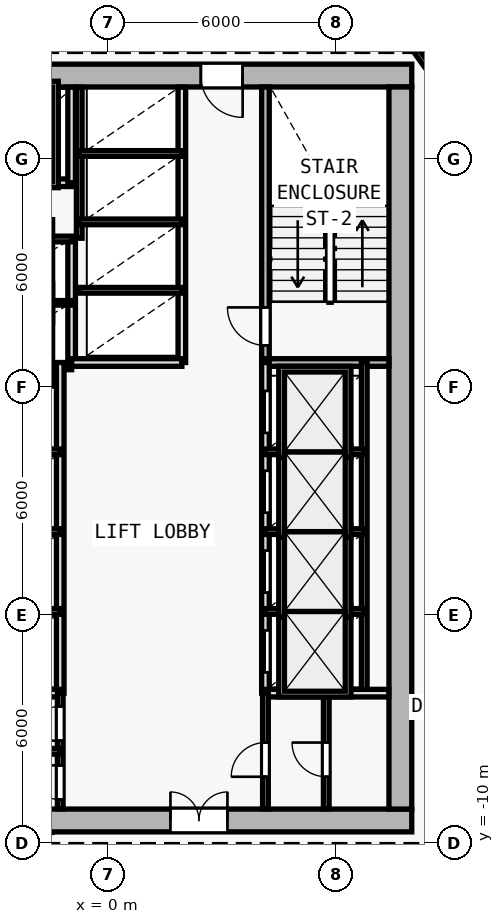
"""IFC4 building model, lengths in metres.
Left out: names, types, materials, properties, quantities, classifications, styles, units other than length and angle.
Written with IfcOpenShell. Run it as: python <this file> out.ifc"""

import sys

from ifc_helpers import new_model, si_unit, direction, frame, frame_2d, origin, origin_2d, place, context, subcontext, project, spatial, rectangle, i_section, extrude, element, fill, save


model = new_model("IFC4")
c1 = context("Model", 3, precision=1e-05, world=origin(), true_north=direction((0.0, 1.0)))
c2 = subcontext(c1, "Body", "Model", "MODEL_VIEW")
j1 = project(units=[si_unit("LENGTHUNIT", "METRE"), si_unit("PLANEANGLEUNIT", "RADIAN")], contexts=[c1])
p1 = place(None, origin())
s1 = spatial("IfcSite", under=j1, at=p1, CompositionType="ELEMENT")
p2 = place(p1, origin())
s2 = spatial("IfcBuilding", under=s1, at=p2, CompositionType="ELEMENT")
p3 = place(p2, frame((0.0, 0.0, 40.8)))
s3 = spatial("IfcBuildingStorey", under=s2, at=p3, CompositionType="ELEMENT", Elevation=40.8)
for number, where, z_axis, x_axis in (
    (1, (7.7, -9.4, 0.0), (0.0, 0.0, 1.0), (1.0, 0.0, 0.0)),
    (2, (7.7, 10.2, 0.0), (0.0, 0.0, 1.0), (1.0, 0.0, 0.0)),
    (3, (0.0, -9.4, 0.0), (0.0, 0.0, 1.0), (1.0, 0.0, 0.0)),
    (4, (7.7, 0.4, 0.0), (0.0, 0.0, 1.0), (1.0, 0.0, 0.0)),
):
    element("IfcColumn", number, at=place(p3, frame(where, z_axis=z_axis, x_axis=x_axis)), inside=s3, PredefinedType="COLUMN", context=c2, shape_type="SweptSolid", body=[
        extrude(i_section(OverallWidth=0.416, OverallDepth=0.446, WebThickness=0.025, FlangeThickness=0.04, FilletRadius=0.015, at=origin_2d()), origin(), (0.0, 0.0, 1.0), 3.6),
    ])
p4 = place(p3, frame((-8.0, -9.4, 0.0), z_axis=(0.0, 0.0, 1.0), x_axis=(1.0, 0.0, 0.0)))
e5 = element("IfcWall", 5, at=p4, inside=s3, PredefinedType="SHEAR", context=c2, shape_type="SweptSolid", body=[
    extrude(rectangle(XDim=16.0, YDim=0.6, at=frame_2d((8.0, 0.0))), origin(), (0.0, 0.0, 1.0), 3.35),
])
p5 = place(p4, frame((9.65, 0.0, 0.0)))
e6 = element("IfcOpeningElement", 6, at=p5, cuts=e5, PredefinedType="OPENING", context=c2, shape_type="SweptSolid", body=[
    extrude(rectangle(XDim=1.5, YDim=2.2, at=frame_2d((0.75, 1.1))), frame((0.0, 0.31, 0.0), z_axis=(0.0, -1.0, 0.0), x_axis=(1.0, 0.0, 0.0)), (0.0, 0.0, 1.0), 0.62),
])
p6 = place(p3, frame((8.0, 10.2, 0.0), z_axis=(0.0, 0.0, 1.0), x_axis=(-1.0, 0.0, 0.0)))
e7 = element("IfcWall", 7, at=p6, inside=s3, PredefinedType="SHEAR", context=c2, shape_type="SweptSolid", body=[
    extrude(rectangle(XDim=16.0, YDim=0.6, at=frame_2d((8.0, 0.0))), origin(), (0.0, 0.0, 1.0), 3.35),
])
p7 = place(p6, frame((4.45, 0.0, 0.0)))
e8 = element("IfcOpeningElement", 8, at=p7, cuts=e7, PredefinedType="OPENING", context=c2, shape_type="SweptSolid", body=[
    extrude(rectangle(XDim=1.1, YDim=2.15, at=frame_2d((0.55, 1.075))), frame((0.0, 0.31, 0.0), z_axis=(0.0, -1.0, 0.0), x_axis=(1.0, 0.0, 0.0)), (0.0, 0.0, 1.0), 0.62),
])
p8 = place(p3, frame((7.7, 9.9, 0.0), z_axis=(0.0, 0.0, 1.0), x_axis=(0.0, -1.0, 0.0)))
e9 = element("IfcWall", 9, at=p8, inside=s3, PredefinedType="SHEAR", context=c2, shape_type="SweptSolid", body=[
    extrude(rectangle(XDim=19.0, YDim=0.6, at=frame_2d((9.5, 0.0))), origin(), (0.0, 0.0, 1.0), 3.35),
])
p9 = place(p3, frame((4.15, 2.75, 0.0), z_axis=(0.0, 0.0, 1.0), x_axis=(0.0, 1.0, 0.0)))
e10 = element("IfcWall", 10, at=p9, inside=s3, PredefinedType="SOLIDWALL", context=c2, shape_type="SweptSolid", body=[
    extrude(rectangle(XDim=7.15, YDim=0.2, at=frame_2d((3.575, 0.0))), origin(), (0.0, 0.0, 1.0), 3.35),
])
p10 = place(p9, frame((0.35, 0.0, 0.0)))
e11 = element("IfcOpeningElement", 11, at=p10, cuts=e10, PredefinedType="OPENING", context=c2, shape_type="SweptSolid", body=[
    extrude(rectangle(XDim=1.0, YDim=2.15, at=frame_2d((0.5, 1.075))), frame((0.0, 0.11, 0.0), z_axis=(0.0, -1.0, 0.0), x_axis=(1.0, 0.0, 0.0)), (0.0, 0.0, 1.0), 0.22),
])
p11 = place(p3, frame((4.05, 2.65, 0.0), z_axis=(0.0, 0.0, 1.0), x_axis=(1.0, 0.0, 0.0)))
e12 = element("IfcWall", 12, at=p11, inside=s3, PredefinedType="SOLIDWALL", context=c2, shape_type="SweptSolid", body=[
    extrude(rectangle(XDim=3.35, YDim=0.2, at=frame_2d((1.675, 0.0))), origin(), (0.0, 0.0, 1.0), 3.35),
])
p12 = place(p3, frame((-0.95, 2.65, 0.0), z_axis=(0.0, 0.0, 1.0), x_axis=(0.0, 1.0, 0.0)))
e13 = element("IfcWall", 13, at=p12, inside=s3, PredefinedType="SOLIDWALL", context=c2, shape_type="SweptSolid", body=[
    extrude(rectangle(XDim=3.27, YDim=0.2, at=frame_2d((1.635, 0.0))), origin(), (0.0, 0.0, 1.0), 3.35),
])
for number, where, z_axis, x_axis in (
    (14, (-3.85, 2.52, 0.0), (0.0, 0.0, 1.0), (1.0, 0.0, 0.0)),
    (15, (-3.85, 4.22, 0.0), (0.0, 0.0, 1.0), (1.0, 0.0, 0.0)),
):
    element("IfcWall", number, at=place(p3, frame(where, z_axis=z_axis, x_axis=x_axis)), inside=s3, PredefinedType="PARTITIONING", context=c2, shape_type="SweptSolid", body=[
        extrude(rectangle(XDim=2.9, YDim=0.12, at=frame_2d((1.45, 0.0))), origin(), (0.0, 0.0, 1.0), 3.35),
    ])
p13 = place(p3, frame((-3.85, 5.9, 0.0), z_axis=(0.0, 0.0, 1.0), x_axis=(1.0, 0.0, 0.0)))
e16 = element("IfcWall", 16, at=p13, inside=s3, PredefinedType="PARTITIONING", context=c2, shape_type="SweptSolid", body=[
    extrude(rectangle(XDim=2.9, YDim=0.15, at=frame_2d((1.45, 0.0))), origin(), (0.0, 0.0, 1.0), 3.35),
])
p14 = place(p3, frame((-3.85, 7.38, 0.0), z_axis=(0.0, 0.0, 1.0), x_axis=(1.0, 0.0, 0.0)))
e17 = element("IfcWall", 17, at=p14, inside=s3, PredefinedType="SOLIDWALL", context=c2, shape_type="SweptSolid", body=[
    extrude(rectangle(XDim=2.9, YDim=0.2, at=frame_2d((1.45, 0.0))), origin(), (0.0, 0.0, 1.0), 3.35),
])
p15 = place(p14, frame((0.85, 0.0, 0.0)))
e18 = element("IfcOpeningElement", 18, at=p15, cuts=e17, PredefinedType="OPENING", context=c2, shape_type="SweptSolid", body=[
    extrude(rectangle(XDim=1.2, YDim=2.2, at=frame_2d((0.6, 1.1))), frame((0.0, 0.11, 0.0), z_axis=(0.0, -1.0, 0.0), x_axis=(1.0, 0.0, 0.0)), (0.0, 0.0, 1.0), 0.22),
])
p16 = place(p3, frame((-0.95, 7.38, 0.0), z_axis=(0.0, 0.0, 1.0), x_axis=(0.0, 1.0, 0.0)))
e19 = element("IfcWall", 19, at=p16, inside=s3, PredefinedType="SOLIDWALL", context=c2, shape_type="SweptSolid", body=[
    extrude(rectangle(XDim=2.515, YDim=0.2, at=frame_2d((1.258, 0.0))), origin(), (0.0, 0.0, 1.0), 3.35),
])
p17 = place(p3, frame((4.15, -6.05, 0.0), z_axis=(0.0, 0.0, 1.0), x_axis=(0.0, 1.0, 0.0)))
e20 = element("IfcWall", 20, at=p17, inside=s3, PredefinedType="SOLIDWALL", context=c2, shape_type="SweptSolid", body=[
    extrude(rectangle(XDim=8.7, YDim=0.2, at=frame_2d((4.35, 0.0))), origin(), (0.0, 0.0, 1.0), 3.35),
])
p18 = place(p17, frame((0.55, 0.0, 0.0)))
e21 = element("IfcOpeningElement", 21, at=p18, cuts=e20, PredefinedType="OPENING", context=c2, shape_type="SweptSolid", body=[
    extrude(rectangle(XDim=1.1, YDim=2.15, at=frame_2d((0.55, 1.075))), frame((0.0, 0.11, 0.0), z_axis=(0.0, -1.0, 0.0), x_axis=(1.0, 0.0, 0.0)), (0.0, 0.0, 1.0), 0.22),
])
p19 = place(p17, frame((2.65, 0.0, 0.0)))
e22 = element("IfcOpeningElement", 22, at=p19, cuts=e20, PredefinedType="OPENING", context=c2, shape_type="SweptSolid", body=[
    extrude(rectangle(XDim=1.1, YDim=2.15, at=frame_2d((0.55, 1.075))), frame((0.0, 0.11, 0.0), z_axis=(0.0, -1.0, 0.0), x_axis=(1.0, 0.0, 0.0)), (0.0, 0.0, 1.0), 0.22),
])
p20 = place(p17, frame((4.75, 0.0, 0.0)))
e23 = element("IfcOpeningElement", 23, at=p20, cuts=e20, PredefinedType="OPENING", context=c2, shape_type="SweptSolid", body=[
    extrude(rectangle(XDim=1.1, YDim=2.15, at=frame_2d((0.55, 1.075))), frame((0.0, 0.11, 0.0), z_axis=(0.0, -1.0, 0.0), x_axis=(1.0, 0.0, 0.0)), (0.0, 0.0, 1.0), 0.22),
])
p21 = place(p17, frame((6.85, 0.0, 0.0)))
e24 = element("IfcOpeningElement", 24, at=p21, cuts=e20, PredefinedType="OPENING", context=c2, shape_type="SweptSolid", body=[
    extrude(rectangle(XDim=1.1, YDim=2.15, at=frame_2d((0.55, 1.075))), frame((0.0, 0.11, 0.0), z_axis=(0.0, -1.0, 0.0), x_axis=(1.0, 0.0, 0.0)), (0.0, 0.0, 1.0), 0.22),
])
p22 = place(p3, frame((6.75, -6.05, 0.0), z_axis=(0.0, 0.0, 1.0), x_axis=(0.0, 1.0, 0.0)))
e25 = element("IfcWall", 25, at=p22, inside=s3, PredefinedType="PARTITIONING", context=c2, shape_type="SweptSolid", body=[
    extrude(rectangle(XDim=8.7, YDim=0.15, at=frame_2d((4.35, 0.0))), origin(), (0.0, 0.0, 1.0), 3.35),
])
for number, where, z_axis, x_axis in (
    (26, (4.15, -3.9, 0.0), (0.0, 0.0, 1.0), (1.0, 0.0, 0.0)),
    (27, (4.15, -1.8, 0.0), (0.0, 0.0, 1.0), (1.0, 0.0, 0.0)),
    (28, (4.15, 0.3, 0.0), (0.0, 0.0, 1.0), (1.0, 0.0, 0.0)),
):
    element("IfcWall", number, at=place(p3, frame(where, z_axis=z_axis, x_axis=x_axis)), inside=s3, PredefinedType="PARTITIONING", context=c2, shape_type="SweptSolid", body=[
        extrude(rectangle(XDim=2.6, YDim=0.15, at=frame_2d((1.3, 0.0))), origin(), (0.0, 0.0, 1.0), 3.35),
    ])
p23 = place(p3, frame((-1.25, -6.05, 0.0), z_axis=(0.0, 0.0, 1.0), x_axis=(0.0, 1.0, 0.0)))
e29 = element("IfcWall", 29, at=p23, inside=s3, PredefinedType="SOLIDWALL", context=c2, shape_type="SweptSolid", body=[
    extrude(rectangle(XDim=8.7, YDim=0.2, at=frame_2d((4.35, 0.0))), origin(), (0.0, 0.0, 1.0), 3.35),
])
for number, where, z_axis, x_axis in (
    (30, (-4.15, -3.9, 0.0), (0.0, 0.0, 1.0), (1.0, 0.0, 0.0)),
    (31, (-4.15, -1.8, 0.0), (0.0, 0.0, 1.0), (1.0, 0.0, 0.0)),
    (32, (-4.15, 0.3, 0.0), (0.0, 0.0, 1.0), (1.0, 0.0, 0.0)),
):
    element("IfcWall", number, at=place(p3, frame(where, z_axis=z_axis, x_axis=x_axis)), inside=s3, PredefinedType="PARTITIONING", context=c2, shape_type="SweptSolid", body=[
        extrude(rectangle(XDim=2.9, YDim=0.15, at=frame_2d((1.45, 0.0))), origin(), (0.0, 0.0, 1.0), 3.35),
    ])
p24 = place(p3, frame((1.95, 2.65, 0.0), z_axis=(0.0, 0.0, 1.0), x_axis=(0.0, 1.0, 0.0)))
e33 = element("IfcWall", 33, at=p24, inside=s3, PredefinedType="SOLIDWALL", context=c2, shape_type="SweptSolid", body=[
    extrude(rectangle(XDim=7.245, YDim=0.2, at=frame_2d((3.623, 0.0))), origin(), (0.0, 0.0, 1.0), 3.35),
])
p25 = place(p3, frame((-0.95, 2.65, 0.0), z_axis=(0.0, 0.0, 1.0), x_axis=(1.0, 0.0, 0.0)))
e34 = element("IfcWall", 34, at=p25, inside=s3, PredefinedType="SOLIDWALL", context=c2, shape_type="SweptSolid", body=[
    extrude(rectangle(XDim=2.9, YDim=0.2, at=frame_2d((1.45, 0.0))), origin(), (0.0, 0.0, 1.0), 3.35),
])
p26 = place(p3, frame((-0.75, 5.92, 0.0), z_axis=(0.0, 0.0, 1.0), x_axis=(0.0, 1.0, 0.0)))
e35 = element("IfcWall", 35, at=p26, inside=s3, PredefinedType="PARTITIONING", context=c2, shape_type="SweptSolid", body=[
    extrude(rectangle(XDim=3.975, YDim=0.15, at=frame_2d((1.988, 0.0))), origin(), (0.0, 0.0, 1.0), 3.35),
])
for number, where, z_axis, x_axis in (
    (36, (-0.75, 4.55, 0.0), (0.0, 0.0, 1.0), (1.0, 0.0, 0.0)),
    (37, (-0.75, 6.35, 0.0), (0.0, 0.0, 1.0), (1.0, 0.0, 0.0)),
    (38, (-0.75, 8.15, 0.0), (0.0, 0.0, 1.0), (1.0, 0.0, 0.0)),
):
    element("IfcWall", number, at=place(p3, frame(where, z_axis=z_axis, x_axis=x_axis)), inside=s3, PredefinedType="PARTITIONING", context=c2, shape_type="SweptSolid", body=[
        extrude(rectangle(XDim=2.7, YDim=0.15, at=frame_2d((1.35, 0.0))), origin(), (0.0, 0.0, 1.0), 3.35),
    ])
p27 = place(p3, frame((-4.04, -6.05, 0.0), z_axis=(0.0, 0.0, 1.0), x_axis=(1.0, 0.0, 0.0)))
e39 = element("IfcWall", 39, at=p27, inside=s3, PredefinedType="SOLIDWALL", context=c2, shape_type="SweptSolid", body=[
    extrude(rectangle(XDim=2.79, YDim=0.2, at=frame_2d((1.395, 0.0))), origin(), (0.0, 0.0, 1.0), 3.35),
])
p28 = place(p3, frame((4.15, -6.05, 0.0), z_axis=(0.0, 0.0, 1.0), x_axis=(1.0, 0.0, 0.0)))
e40 = element("IfcWall", 40, at=p28, inside=s3, PredefinedType="SOLIDWALL", context=c2, shape_type="SweptSolid", body=[
    extrude(rectangle(XDim=3.245, YDim=0.2, at=frame_2d((1.623, 0.0))), origin(), (0.0, 0.0, 1.0), 3.35),
])
p29 = place(p3, frame((-1.25, -9.095, 0.0), z_axis=(0.0, 0.0, 1.0), x_axis=(0.0, 1.0, 0.0)))
e41 = element("IfcWall", 41, at=p29, inside=s3, PredefinedType="PARTITIONING", context=c2, shape_type="SweptSolid", body=[
    extrude(rectangle(XDim=3.045, YDim=0.15, at=frame_2d((1.522, 0.0))), origin(), (0.0, 0.0, 1.0), 3.35),
])
p30 = place(p29, frame((1.795, 0.0, 0.0)))
e42 = element("IfcOpeningElement", 42, at=p30, cuts=e41, PredefinedType="OPENING", context=c2, shape_type="SweptSolid", body=[
    extrude(rectangle(XDim=0.9, YDim=2.1, at=frame_2d((0.45, 1.05))), frame((0.0, 0.085, 0.0), z_axis=(0.0, -1.0, 0.0), x_axis=(1.0, 0.0, 0.0)), (0.0, 0.0, 1.0), 0.17),
])
p31 = place(p29, frame((0.245, 0.0, 0.0)))
e43 = element("IfcOpeningElement", 43, at=p31, cuts=e41, PredefinedType="OPENING", context=c2, shape_type="SweptSolid", body=[
    extrude(rectangle(XDim=0.9, YDim=2.1, at=frame_2d((0.45, 1.05))), frame((0.0, 0.085, 0.0), z_axis=(0.0, -1.0, 0.0), x_axis=(1.0, 0.0, 0.0)), (0.0, 0.0, 1.0), 0.17),
])
p32 = place(p3, frame((4.15, -9.095, 0.0), z_axis=(0.0, 0.0, 1.0), x_axis=(0.0, 1.0, 0.0)))
e44 = element("IfcWall", 44, at=p32, inside=s3, PredefinedType="PARTITIONING", context=c2, shape_type="SweptSolid", body=[
    extrude(rectangle(XDim=3.045, YDim=0.15, at=frame_2d((1.522, 0.0))), origin(), (0.0, 0.0, 1.0), 3.35),
])
p33 = place(p32, frame((0.845, 0.0, 0.0)))
e45 = element("IfcOpeningElement", 45, at=p33, cuts=e44, PredefinedType="OPENING", context=c2, shape_type="SweptSolid", body=[
    extrude(rectangle(XDim=0.9, YDim=2.1, at=frame_2d((0.45, 1.05))), frame((0.0, 0.085, 0.0), z_axis=(0.0, -1.0, 0.0), x_axis=(1.0, 0.0, 0.0)), (0.0, 0.0, 1.0), 0.17),
])
p34 = place(p3, frame((-7.395, -7.58, 0.0), z_axis=(0.0, 0.0, 1.0), x_axis=(1.0, 0.0, 0.0)))
e46 = element("IfcWall", 46, at=p34, inside=s3, PredefinedType="PARTITIONING", context=c2, shape_type="SweptSolid", body=[
    extrude(rectangle(XDim=6.145, YDim=0.15, at=frame_2d((3.073, 0.0))), origin(), (0.0, 0.0, 1.0), 3.35),
])
p35 = place(p3, frame((5.75, -9.095, 0.0), z_axis=(0.0, 0.0, 1.0), x_axis=(0.0, 1.0, 0.0)))
e47 = element("IfcWall", 47, at=p35, inside=s3, PredefinedType="PARTITIONING", context=c2, shape_type="SweptSolid", body=[
    extrude(rectangle(XDim=3.045, YDim=0.15, at=frame_2d((1.522, 0.0))), origin(), (0.0, 0.0, 1.0), 3.35),
])
p36 = place(p35, frame((0.845, 0.0, 0.0)))
e48 = element("IfcOpeningElement", 48, at=p36, cuts=e47, PredefinedType="OPENING", context=c2, shape_type="SweptSolid", body=[
    extrude(rectangle(XDim=0.9, YDim=2.1, at=frame_2d((0.45, 1.05))), frame((0.0, 0.085, 0.0), z_axis=(0.0, -1.0, 0.0), x_axis=(1.0, 0.0, 0.0)), (0.0, 0.0, 1.0), 0.17),
])
p37 = place(p3, frame((7.041, 12.36, 0.0), z_axis=(0.0, 0.0, 1.0), x_axis=(0.582449511476, -0.812866881218, 0.0)))
e49 = element("IfcWall", 49, at=p37, inside=s3, PredefinedType="PARTITIONING", context=c2, shape_type="SweptSolid", body=[
    extrude(rectangle(XDim=4.84, YDim=0.15, at=frame_2d((2.42, 0.0))), origin(), (0.0, 0.0, 1.0), 2.725),
])
p38 = place(p5, origin())
e50 = element("IfcDoor", 50, at=p38, inside=s3, OperationType="DOUBLE_DOOR_SINGLE_SWING", PredefinedType="DOOR", context=c2, shape_type="SweptSolid", body=[
    extrude(rectangle(XDim=1.5, YDim=2.2, at=frame_2d((0.75, 1.1))), frame((0.0, 0.025, 0.0), z_axis=(0.0, -1.0, 0.0), x_axis=(1.0, 0.0, 0.0)), (0.0, 0.0, 1.0), 0.05),
])
fill(e6, e50)
p39 = place(p7, origin())
e51 = element("IfcDoor", 51, at=p39, inside=s3, OperationType="SINGLE_SWING_LEFT", PredefinedType="DOOR", context=c2, shape_type="SweptSolid", body=[
    extrude(rectangle(XDim=1.1, YDim=2.15, at=frame_2d((0.55, 1.075))), frame((0.0, 0.025, 0.0), z_axis=(0.0, -1.0, 0.0), x_axis=(1.0, 0.0, 0.0)), (0.0, 0.0, 1.0), 0.05),
])
fill(e8, e51)
p40 = place(p10, origin())
e52 = element("IfcDoor", 52, at=p40, inside=s3, OperationType="SINGLE_SWING_RIGHT", PredefinedType="DOOR", context=c2, shape_type="SweptSolid", body=[
    extrude(rectangle(XDim=1.0, YDim=2.15, at=frame_2d((0.5, 1.075))), frame((0.0, 0.025, 0.0), z_axis=(0.0, -1.0, 0.0), x_axis=(1.0, 0.0, 0.0)), (0.0, 0.0, 1.0), 0.05),
])
fill(e11, e52)
p41 = place(p18, origin())
e53 = element("IfcDoor", 53, at=p41, inside=s3, OperationType="DOUBLE_DOOR_SLIDING", PredefinedType="DOOR", context=c2, shape_type="SweptSolid", body=[
    extrude(rectangle(XDim=1.1, YDim=2.15, at=frame_2d((0.55, 1.075))), frame((0.0, 0.025, 0.0), z_axis=(0.0, -1.0, 0.0), x_axis=(1.0, 0.0, 0.0)), (0.0, 0.0, 1.0), 0.05),
])
fill(e21, e53)
p42 = place(p19, origin())
e54 = element("IfcDoor", 54, at=p42, inside=s3, OperationType="DOUBLE_DOOR_SLIDING", PredefinedType="DOOR", context=c2, shape_type="SweptSolid", body=[
    extrude(rectangle(XDim=1.1, YDim=2.15, at=frame_2d((0.55, 1.075))), frame((0.0, 0.025, 0.0), z_axis=(0.0, -1.0, 0.0), x_axis=(1.0, 0.0, 0.0)), (0.0, 0.0, 1.0), 0.05),
])
fill(e22, e54)
p43 = place(p20, origin())
e55 = element("IfcDoor", 55, at=p43, inside=s3, OperationType="DOUBLE_DOOR_SLIDING", PredefinedType="DOOR", context=c2, shape_type="SweptSolid", body=[
    extrude(rectangle(XDim=1.1, YDim=2.15, at=frame_2d((0.55, 1.075))), frame((0.0, 0.025, 0.0), z_axis=(0.0, -1.0, 0.0), x_axis=(1.0, 0.0, 0.0)), (0.0, 0.0, 1.0), 0.05),
])
fill(e23, e55)
p44 = place(p21, origin())
e56 = element("IfcDoor", 56, at=p44, inside=s3, OperationType="DOUBLE_DOOR_SLIDING", PredefinedType="DOOR", context=c2, shape_type="SweptSolid", body=[
    extrude(rectangle(XDim=1.1, YDim=2.15, at=frame_2d((0.55, 1.075))), frame((0.0, 0.025, 0.0), z_axis=(0.0, -1.0, 0.0), x_axis=(1.0, 0.0, 0.0)), (0.0, 0.0, 1.0), 0.05),
])
fill(e24, e56)
p45 = place(p30, origin())
e57 = element("IfcDoor", 57, at=p45, inside=s3, OperationType="SINGLE_SWING_LEFT", PredefinedType="DOOR", context=c2, shape_type="SweptSolid", body=[
    extrude(rectangle(XDim=0.9, YDim=2.1, at=frame_2d((0.45, 1.05))), frame((0.0, 0.025, 0.0), z_axis=(0.0, -1.0, 0.0), x_axis=(1.0, 0.0, 0.0)), (0.0, 0.0, 1.0), 0.05),
])
fill(e42, e57)
p46 = place(p31, origin())
e58 = element("IfcDoor", 58, at=p46, inside=s3, OperationType="SINGLE_SWING_RIGHT", PredefinedType="DOOR", context=c2, shape_type="SweptSolid", body=[
    extrude(rectangle(XDim=0.9, YDim=2.1, at=frame_2d((0.45, 1.05))), frame((0.0, 0.025, 0.0), z_axis=(0.0, -1.0, 0.0), x_axis=(1.0, 0.0, 0.0)), (0.0, 0.0, 1.0), 0.05),
])
fill(e43, e58)
p47 = place(p33, origin())
e59 = element("IfcDoor", 59, at=p47, inside=s3, OperationType="SINGLE_SWING_LEFT", PredefinedType="DOOR", context=c2, shape_type="SweptSolid", body=[
    extrude(rectangle(XDim=0.9, YDim=2.1, at=frame_2d((0.45, 1.05))), frame((0.0, 0.025, 0.0), z_axis=(0.0, -1.0, 0.0), x_axis=(1.0, 0.0, 0.0)), (0.0, 0.0, 1.0), 0.05),
])
fill(e45, e59)
p48 = place(p36, origin())
e60 = element("IfcDoor", 60, at=p48, inside=s3, OperationType="SINGLE_SWING_RIGHT", PredefinedType="DOOR", context=c2, shape_type="SweptSolid", body=[
    extrude(rectangle(XDim=0.9, YDim=2.1, at=frame_2d((0.45, 1.05))), frame((0.0, 0.025, 0.0), z_axis=(0.0, -1.0, 0.0), x_axis=(1.0, 0.0, 0.0)), (0.0, 0.0, 1.0), 0.05),
])
fill(e48, e60)
save(model, sys.argv[1])
